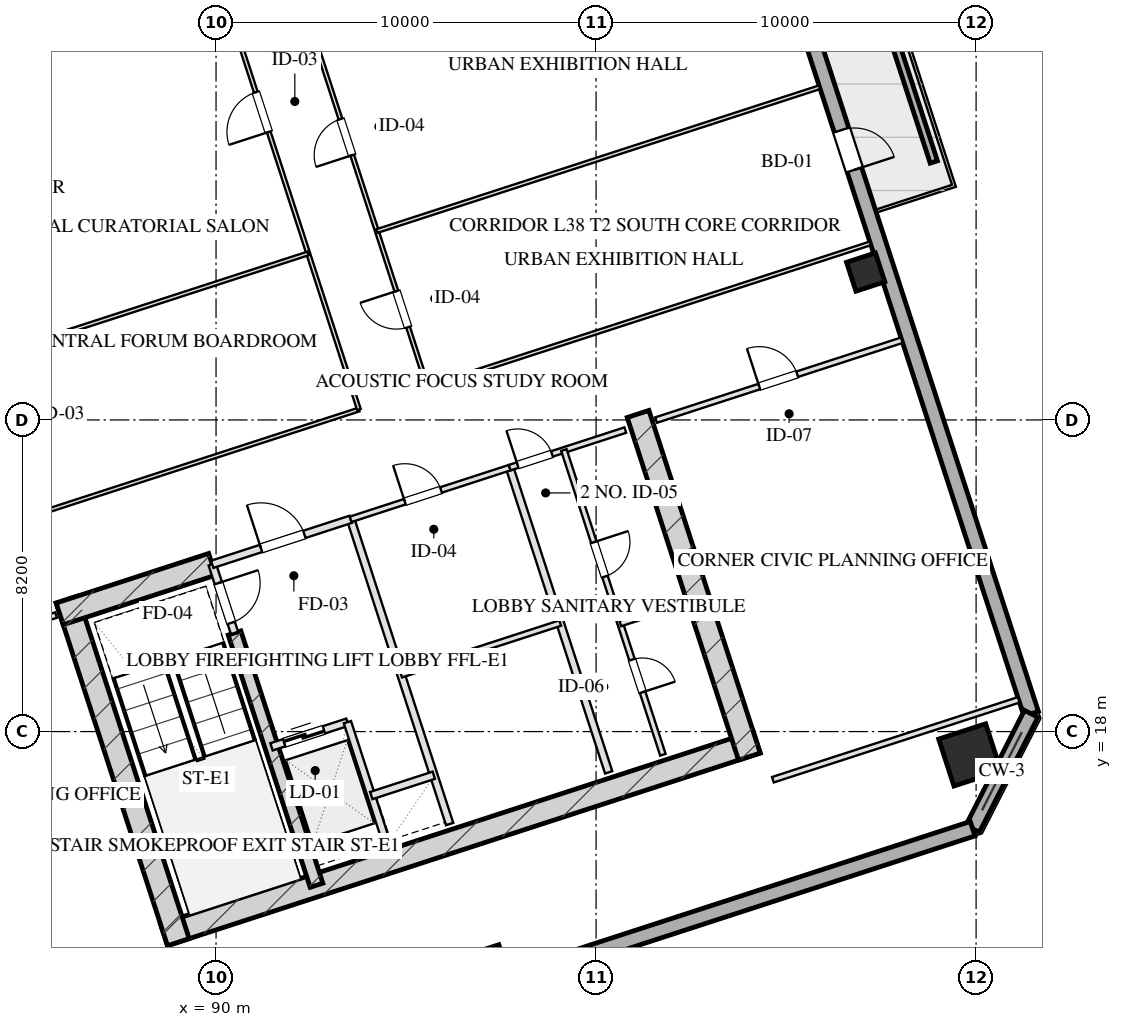
"""IFC4 building model, lengths in metres.
Left out: names, types, materials, properties, quantities, classifications, styles, units other than length and angle.
Written with IfcOpenShell. Run it as: python <this file> out.ifc"""

import sys

from ifc_helpers import new_model, si_unit, direction, frame, frame_2d, origin, origin_2d, place, context, subcontext, project, spatial, rectangle, hollow_rectangle, extrude, element, fill, save


model = new_model("IFC4")
c1 = context("Model", 3, precision=1e-05, world=origin(), true_north=direction((0.0, 1.0)))
c2 = subcontext(c1, "Body", "Model", "MODEL_VIEW")
j1 = project(units=[si_unit("LENGTHUNIT", "METRE"), si_unit("PLANEANGLEUNIT", "RADIAN")], contexts=[c1])
p1 = place(None, origin())
s1 = spatial("IfcSite", under=j1, at=p1, CompositionType="ELEMENT")
p2 = place(p1, origin())
s2 = spatial("IfcBuilding", under=s1, at=p2, CompositionType="ELEMENT")
p3 = place(p2, frame((0.0, 0.0, 146.05)))
s3 = spatial("IfcBuildingStorey", under=s2, at=p3, CompositionType="ELEMENT", Elevation=146.05)
p4 = place(p3, frame((88.63, 12.652, 0.0), z_axis=(0.0, 0.0, 1.0), x_axis=(0.95105714907, 0.309015046886, 0.0)))
e1 = element("IfcWall", 1, at=p4, inside=s3, PredefinedType="SHEAR", context=c2, shape_type="SweptSolid", body=[
    extrude(rectangle(XDim=16.4, YDim=0.6, at=frame_2d((8.2, 0.0))), origin(), (0.0, 0.0, 1.0), 3.45),
])
p5 = place(p3, frame((86.078, 21.475, 0.0), z_axis=(0.0, 0.0, 1.0), x_axis=(0.309017938678, -0.951056209472, 0.0)))
e2 = element("IfcWall", 2, at=p5, inside=s3, PredefinedType="SHEAR", context=c2, shape_type="SweptSolid", body=[
    extrude(rectangle(XDim=9.48, YDim=0.6, at=frame_2d((4.74, 0.0))), origin(), (0.0, 0.0, 1.0), 3.45),
])
p6 = place(p3, frame((101.105, 26.358, 0.0), z_axis=(0.0, 0.0, 1.0), x_axis=(0.309010370028, -0.95105866865, 0.0)))
e3 = element("IfcWall", 3, at=p6, inside=s3, PredefinedType="SHEAR", context=c2, shape_type="SweptSolid", body=[
    extrude(rectangle(XDim=9.48, YDim=0.6, at=frame_2d((4.74, 0.0))), origin(), (0.0, 0.0, 1.0), 3.45),
])
p7 = place(p3, frame((90.486, 20.594, 0.0), z_axis=(0.0, 0.0, 1.0), x_axis=(0.309020428229, -0.951055400562, 0.0)))
e4 = element("IfcWall", 4, at=p7, inside=s3, PredefinedType="SHEAR", context=c2, shape_type="SweptSolid", body=[
    extrude(rectangle(XDim=6.98, YDim=0.35, at=frame_2d((3.49, 0.0))), origin(), (0.0, 0.0, 1.0), 3.45),
])
p8 = place(p3, frame((85.886, 21.097, 0.0), z_axis=(0.0, 0.0, 1.0), x_axis=(0.951068073652, 0.308981422225, 0.0)))
e5 = element("IfcWall", 5, at=p8, inside=s3, PredefinedType="SHEAR", context=c2, shape_type="SweptSolid", body=[
    extrude(rectangle(XDim=4.22, YDim=0.6, at=frame_2d((2.11, 0.0))), origin(), (0.0, 0.0, 1.0), 3.45),
])
p9 = place(p3, frame((109.835, 17.386, 0.0), z_axis=(0.0, 0.0, 1.0), x_axis=(0.951056516295, 0.309016994375, 0.0)))
e6 = element("IfcColumn", 6, at=p9, inside=s3, PredefinedType="COLUMN", context=c2, shape_type="SweptSolid", body=[
    extrude(hollow_rectangle(XDim=1.3, YDim=1.3, WallThickness=0.045, at=origin_2d()), origin(), (0.0, 0.0, 1.0), 3.451),
])
for number, where, z_axis, x_axis in (
    (7, (107.094, 30.091, 0.0), (0.0, 0.0, 1.0), (0.951, 0.309, 0.0)),
    (8, (97.185, 11.888, 0.0), (0.0, 0.0, 1.0), (0.951, 0.309, 0.0)),
):
    element("IfcColumn", number, at=place(p3, frame(where, z_axis=z_axis, x_axis=x_axis)), inside=s3, PredefinedType="COLUMN", context=c2, shape_type="SweptSolid", body=[
        extrude(hollow_rectangle(XDim=0.8, YDim=0.8, WallThickness=0.028, at=origin_2d()), origin(), (0.0, 0.0, 1.0), 3.451),
    ])
p10 = place(p3, frame((98.224, 59.173, 0.0), z_axis=(0.0, 0.0, 1.0), x_axis=(0.309014228706, -0.951057414911, 0.0)))
e9 = element("IfcWall", 9, at=p10, inside=s3, PredefinedType="SOLIDWALL", context=c2, shape_type="SweptSolid", body=[
    extrude(rectangle(XDim=42.8, YDim=0.4, at=frame_2d((21.4, 0.0))), origin(), (0.0, 0.0, 1.0), 2.61),
])
p11 = place(p10, frame((13.875, 0.0, 0.75)))
e10 = element("IfcOpeningElement", 10, at=p11, cuts=e9, PredefinedType="OPENING", context=c2, shape_type="SweptSolid", body=[
    extrude(rectangle(XDim=2.25, YDim=1.46, at=frame_2d((1.125, 0.73))), frame((0.0, 0.21, 0.0), z_axis=(0.0, -1.0, 0.0), x_axis=(1.0, 0.0, 0.0)), (0.0, 0.0, 1.0), 0.42),
])
p12 = place(p10, frame((26.65, 0.0, 0.0)))
e11 = element("IfcOpeningElement", 11, at=p12, cuts=e9, PredefinedType="OPENING", context=c2, shape_type="SweptSolid", body=[
    extrude(rectangle(XDim=1.1, YDim=2.15, at=frame_2d((0.55, 1.075))), frame((0.0, 0.21, 0.0), z_axis=(0.0, -1.0, 0.0), x_axis=(1.0, 0.0, 0.0)), (0.0, 0.0, 1.0), 0.42),
])
p13 = place(p3, frame((111.449, 18.468, 0.0), z_axis=(0.0, 0.0, 1.0), x_axis=(-0.454019523198, -0.890991735402, 0.0)))
e12 = element("IfcWall", 12, at=p13, inside=s3, PredefinedType="SOLIDWALL", context=c2, shape_type="SweptSolid", body=[
    extrude(rectangle(XDim=3.394, YDim=0.4, at=frame_2d((1.697, 0.0))), origin(), (0.0, 0.0, 1.0), 2.61),
])
p14 = place(p3, frame((109.908, 15.444, 0.0), z_axis=(0.0, 0.0, 1.0), x_axis=(-0.951057580055, -0.30901372044, 0.0)))
e13 = element("IfcWall", 13, at=p14, inside=s3, PredefinedType="SOLIDWALL", context=c2, shape_type="SweptSolid", body=[
    extrude(rectangle(XDim=26.4, YDim=0.4, at=frame_2d((13.2, 0.0))), origin(), (0.0, 0.0, 1.0), 2.61),
])
p15 = place(p3, frame((108.887, 32.987, 0.0), z_axis=(0.0, 0.0, 1.0), x_axis=(-0.30900096172, 0.951061725471, 0.0)))
e14 = element("IfcWall", 14, at=p15, inside=s3, PredefinedType="PARAPET", context=c2, shape_type="SweptSolid", body=[
    extrude(rectangle(XDim=4.8, YDim=0.2, at=frame_2d((2.4, 0.0))), origin(), (0.0, 0.0, 1.0), 0.75),
])
p16 = place(p3, frame((89.899, 22.401, 0.0), z_axis=(0.0, 0.0, 1.0), x_axis=(0.308932062672, -0.951084108086, 0.0)))
e15 = element("IfcWall", 15, at=p16, inside=s3, PredefinedType="PARTITIONING", context=c2, shape_type="SweptSolid", body=[
    extrude(rectangle(XDim=1.9, YDim=0.2, at=frame_2d((0.95, 0.0))), origin(), (0.0, 0.0, 1.0), 3.175),
])
p17 = place(p16, frame((0.52, 0.0, 0.0)))
e16 = element("IfcOpeningElement", 16, at=p17, cuts=e15, PredefinedType="OPENING", context=c2, shape_type="SweptSolid", body=[
    extrude(rectangle(XDim=1.1, YDim=2.05, at=frame_2d((0.55, 1.025))), frame((0.0, 0.11, 0.0), z_axis=(0.0, -1.0, 0.0), x_axis=(1.0, 0.0, 0.0)), (0.0, 0.0, 1.0), 0.22),
])
p18 = place(p3, frame((93.542, 23.585, 0.0), z_axis=(0.0, 0.0, 1.0), x_axis=(0.309042196757, -0.951048327176, 0.0)))
e17 = element("IfcWall", 17, at=p18, inside=s3, PredefinedType="PARTITIONING", context=c2, shape_type="SweptSolid", body=[
    extrude(rectangle(XDim=8.43, YDim=0.2, at=frame_2d((4.215, 0.0))), origin(), (0.0, 0.0, 1.0), 3.175),
])
p19 = place(p3, frame((89.899, 22.401, 0.0), z_axis=(0.0, 0.0, 1.0), x_axis=(0.951046716504, 0.309047153403, 0.0)))
e18 = element("IfcWall", 18, at=p19, inside=s3, PredefinedType="PARTITIONING", context=c2, shape_type="SweptSolid", body=[
    extrude(rectangle(XDim=3.83, YDim=0.2, at=frame_2d((1.915, 0.0))), origin(), (0.0, 0.0, 1.0), 3.175),
])
p20 = place(p19, frame((1.35, 0.0, 0.0)))
e19 = element("IfcOpeningElement", 19, at=p20, cuts=e18, PredefinedType="OPENING", context=c2, shape_type="SweptSolid", body=[
    extrude(rectangle(XDim=1.2, YDim=2.05, at=frame_2d((0.6, 1.025))), frame((0.0, 0.11, 0.0), z_axis=(0.0, -1.0, 0.0), x_axis=(1.0, 0.0, 0.0)), (0.0, 0.0, 1.0), 0.22),
])
p21 = place(p3, frame((91.46, 17.598, 0.0), z_axis=(0.0, 0.0, 1.0), x_axis=(0.951062257173, 0.308999325213, 0.0)))
e20 = element("IfcWall", 20, at=p21, inside=s3, PredefinedType="PARTITIONING", context=c2, shape_type="SweptSolid", body=[
    extrude(rectangle(XDim=2.1, YDim=0.2, at=frame_2d((1.05, 0.0))), origin(), (0.0, 0.0, 1.0), 3.175),
])
p22 = place(p21, frame((0.35, 0.0, 0.0)))
e21 = element("IfcOpeningElement", 21, at=p22, cuts=e20, PredefinedType="OPENING", context=c2, shape_type="SweptSolid", body=[
    extrude(rectangle(XDim=1.1, YDim=2.05, at=frame_2d((0.55, 1.025))), frame((0.0, 0.11, 0.0), z_axis=(0.0, -1.0, 0.0), x_axis=(1.0, 0.0, 0.0)), (0.0, 0.0, 1.0), 0.22),
])
p23 = place(p3, frame((93.457, 18.247, 0.0), z_axis=(0.0, 0.0, 1.0), x_axis=(0.3089935693, -0.951064127245, 0.0)))
e22 = element("IfcWall", 22, at=p23, inside=s3, PredefinedType="PARTITIONING", context=c2, shape_type="SweptSolid", body=[
    extrude(rectangle(XDim=3.7, YDim=0.2, at=frame_2d((1.85, 0.0))), origin(), (0.0, 0.0, 1.0), 3.175),
])
p24 = place(p3, frame((94.084, 16.317, 0.0), z_axis=(0.0, 0.0, 1.0), x_axis=(0.951041328149, 0.309063734775, 0.0)))
e23 = element("IfcWall", 23, at=p24, inside=s3, PredefinedType="PARTITIONING", context=c2, shape_type="SweptSolid", body=[
    extrude(rectangle(XDim=1.73, YDim=0.2, at=frame_2d((0.865, 0.0))), origin(), (0.0, 0.0, 1.0), 3.175),
])
p25 = place(p3, frame((97.727, 24.944, 0.0), z_axis=(0.0, 0.0, 1.0), x_axis=(0.309016001439, -0.951056838919, 0.0)))
e24 = element("IfcWall", 24, at=p25, inside=s3, PredefinedType="PARTITIONING", context=c2, shape_type="SweptSolid", body=[
    extrude(rectangle(XDim=8.43, YDim=0.2, at=frame_2d((4.215, 0.0))), origin(), (0.0, 0.0, 1.0), 3.175),
])
p26 = place(p3, frame((93.542, 23.585, 0.0), z_axis=(0.0, 0.0, 1.0), x_axis=(0.951063829732, 0.308994485023, 0.0)))
e25 = element("IfcWall", 25, at=p26, inside=s3, PredefinedType="PARTITIONING", context=c2, shape_type="SweptSolid", body=[
    extrude(rectangle(XDim=4.4, YDim=0.15, at=frame_2d((2.2, 0.0))), origin(), (0.0, 0.0, 1.0), 3.175),
])
p27 = place(p26, frame((1.5, 0.0, 0.0)))
e26 = element("IfcOpeningElement", 26, at=p27, cuts=e25, PredefinedType="OPENING", context=c2, shape_type="SweptSolid", body=[
    extrude(rectangle(XDim=1.0, YDim=2.05, at=frame_2d((0.5, 1.025))), frame((0.0, 0.085, 0.0), z_axis=(0.0, -1.0, 0.0), x_axis=(1.0, 0.0, 0.0)), (0.0, 0.0, 1.0), 0.17),
])
p28 = place(p3, frame((94.871, 19.495, 0.0), z_axis=(0.0, 0.0, 1.0), x_axis=(0.951042223598, 0.309060979314, 0.0)))
e27 = element("IfcWall", 27, at=p28, inside=s3, PredefinedType="PARTITIONING", context=c2, shape_type="SweptSolid", body=[
    extrude(rectangle(XDim=4.4, YDim=0.15, at=frame_2d((2.2, 0.0))), origin(), (0.0, 0.0, 1.0), 3.175),
])
p29 = place(p3, frame((97.727, 24.944, 0.0), z_axis=(0.0, 0.0, 1.0), x_axis=(0.951036872128, 0.309077446369, 0.0)))
e28 = element("IfcWall", 28, at=p29, inside=s3, PredefinedType="PARTITIONING", context=c2, shape_type="SweptSolid", body=[
    extrude(rectangle(XDim=3.2, YDim=0.15, at=frame_2d((1.6, 0.0))), origin(), (0.0, 0.0, 1.0), 3.175),
])
p30 = place(p29, frame((0.22, 0.0, 0.0)))
e29 = element("IfcOpeningElement", 29, at=p30, cuts=e28, PredefinedType="OPENING", context=c2, shape_type="SweptSolid", body=[
    extrude(rectangle(XDim=0.95, YDim=2.05, at=frame_2d((0.475, 1.025))), frame((0.0, 0.085, 0.0), z_axis=(0.0, -1.0, 0.0), x_axis=(1.0, 0.0, 0.0)), (0.0, 0.0, 1.0), 0.17),
])
p31 = place(p3, frame((99.153, 25.408, 0.0), z_axis=(0.0, 0.0, 1.0), x_axis=(0.309016001439, -0.951056838919, 0.0)))
e30 = element("IfcWall", 30, at=p31, inside=s3, PredefinedType="PARTITIONING", context=c2, shape_type="SweptSolid", body=[
    extrude(rectangle(XDim=8.43, YDim=0.15, at=frame_2d((4.215, 0.0))), origin(), (0.0, 0.0, 1.0), 3.175),
])
p32 = place(p31, frame((2.55, 0.0, 0.0)))
e31 = element("IfcOpeningElement", 31, at=p32, cuts=e30, PredefinedType="OPENING", context=c2, shape_type="SweptSolid", body=[
    extrude(rectangle(XDim=0.95, YDim=2.05, at=frame_2d((0.475, 1.025))), frame((0.0, 0.085, 0.0), z_axis=(0.0, -1.0, 0.0), x_axis=(1.0, 0.0, 0.0)), (0.0, 0.0, 1.0), 0.17),
])
p33 = place(p31, frame((5.8, 0.0, 0.0)))
e32 = element("IfcOpeningElement", 32, at=p33, cuts=e30, PredefinedType="OPENING", context=c2, shape_type="SweptSolid", body=[
    extrude(rectangle(XDim=0.9, YDim=2.05, at=frame_2d((0.45, 1.025))), frame((0.0, 0.085, 0.0), z_axis=(0.0, -1.0, 0.0), x_axis=(1.0, 0.0, 0.0)), (0.0, 0.0, 1.0), 0.17),
])
p34 = place(p3, frame((100.636, 20.843, 0.0), z_axis=(0.0, 0.0, 1.0), x_axis=(0.951040401051, 0.309066587596, 0.0)))
e33 = element("IfcWall", 33, at=p34, inside=s3, PredefinedType="PARTITIONING", context=c2, shape_type="SweptSolid", body=[
    extrude(rectangle(XDim=1.7, YDim=0.15, at=frame_2d((0.85, 0.0))), origin(), (0.0, 0.0, 1.0), 3.175),
])
p35 = place(p3, frame((78.753, 18.78, 0.0), z_axis=(0.0, 0.0, 1.0), x_axis=(0.951060977215, 0.309003264738, 0.0)))
e34 = element("IfcWall", 34, at=p35, inside=s3, PredefinedType="PARTITIONING", context=c2, shape_type="SweptSolid", body=[
    extrude(rectangle(XDim=7.4, YDim=0.15, at=frame_2d((3.7, 0.0))), origin(), (0.0, 0.0, 1.0), 3.175),
])
p36 = place(p35, frame((3.108, 0.0, 0.0)))
e35 = element("IfcOpeningElement", 35, at=p36, cuts=e34, PredefinedType="OPENING", context=c2, shape_type="SweptSolid", body=[
    extrude(rectangle(XDim=1.0, YDim=2.05, at=frame_2d((0.5, 1.025))), frame((0.0, 0.085, 0.0), z_axis=(0.0, -1.0, 0.0), x_axis=(1.0, 0.0, 0.0)), (0.0, 0.0, 1.0), 0.17),
])
p37 = place(p3, frame((104.653, 16.733, 0.0), z_axis=(0.0, 0.0, 1.0), x_axis=(0.951054383043, 0.309023559774, 0.0)))
e36 = element("IfcWall", 36, at=p37, inside=s3, PredefinedType="PARTITIONING", context=c2, shape_type="SweptSolid", body=[
    extrude(rectangle(XDim=6.8, YDim=0.15, at=frame_2d((3.4, 0.0))), origin(), (0.0, 0.0, 1.0), 3.175),
])
p38 = place(p3, frame((101.578, 26.196, 0.0), z_axis=(0.0, 0.0, 1.0), x_axis=(0.951064934653, 0.308991084134, 0.0)))
e37 = element("IfcWall", 37, at=p38, inside=s3, PredefinedType="PARTITIONING", context=c2, shape_type="SweptSolid", body=[
    extrude(rectangle(XDim=6.8, YDim=0.15, at=frame_2d((3.4, 0.0))), origin(), (0.0, 0.0, 1.0), 3.175),
])
p39 = place(p38, frame((2.856, 0.0, 0.0)))
e38 = element("IfcOpeningElement", 38, at=p39, cuts=e37, PredefinedType="OPENING", context=c2, shape_type="SweptSolid", body=[
    extrude(rectangle(XDim=1.05, YDim=2.05, at=frame_2d((0.525, 1.025))), frame((0.0, 0.085, 0.0), z_axis=(0.0, -1.0, 0.0), x_axis=(1.0, 0.0, 0.0)), (0.0, 0.0, 1.0), 0.17),
])
p40 = place(p3, frame((85.248, 23.708, 0.0), z_axis=(0.0, 0.0, 1.0), x_axis=(0.951059123431, 0.309008970321, 0.0)))
e39 = element("IfcWall", 39, at=p40, inside=s3, PredefinedType="MOVABLE", context=c2, shape_type="SweptSolid", body=[
    extrude(rectangle(XDim=8.95, YDim=0.1, at=frame_2d((4.475, 0.0))), origin(), (0.0, 0.0, 1.0), 3.175),
])
p41 = place(p3, frame((95.567, 27.061, 0.0), z_axis=(0.0, 0.0, 1.0), x_axis=(0.9510516424, 0.30903199428, 0.0)))
e40 = element("IfcWall", 40, at=p41, inside=s3, PredefinedType="MOVABLE", context=c2, shape_type="SweptSolid", body=[
    extrude(rectangle(XDim=12.25, YDim=0.1, at=frame_2d((6.125, 0.0))), origin(), (0.0, 0.0, 1.0), 3.175),
])
p42 = place(p3, frame((93.76, 26.473, 0.0), z_axis=(0.0, 0.0, 1.0), x_axis=(-0.309004459387, 0.951060589068, 0.0)))
e41 = element("IfcWall", 41, at=p42, inside=s3, PredefinedType="MOVABLE", context=c2, shape_type="SweptSolid", body=[
    extrude(rectangle(XDim=16.64, YDim=0.1, at=frame_2d((8.32, 0.0))), origin(), (0.0, 0.0, 1.0), 3.175),
])
p43 = place(p42, frame((7.68, 0.0, 0.0)))
e42 = element("IfcOpeningElement", 42, at=p43, cuts=e41, PredefinedType="OPENING", context=c2, shape_type="SweptSolid", body=[
    extrude(rectangle(XDim=1.1, YDim=2.05, at=frame_2d((0.55, 1.025))), frame((0.0, 0.06, 0.0), z_axis=(0.0, -1.0, 0.0), x_axis=(1.0, 0.0, 0.0)), (0.0, 0.0, 1.0), 0.12),
])
p44 = place(p3, frame((95.567, 27.061, 0.0), z_axis=(0.0, 0.0, 1.0), x_axis=(-0.30901773025, 0.951056277195, 0.0)))
e43 = element("IfcWall", 43, at=p44, inside=s3, PredefinedType="MOVABLE", context=c2, shape_type="SweptSolid", body=[
    extrude(rectangle(XDim=16.64, YDim=0.1, at=frame_2d((8.32, 0.0))), origin(), (0.0, 0.0, 1.0), 3.175),
])
p45 = place(p44, frame((1.66, 0.0, 0.0)))
e44 = element("IfcOpeningElement", 44, at=p45, cuts=e43, PredefinedType="OPENING", context=c2, shape_type="SweptSolid", body=[
    extrude(rectangle(XDim=1.0, YDim=2.05, at=frame_2d((0.5, 1.025))), frame((0.0, 0.06, 0.0), z_axis=(0.0, -1.0, 0.0), x_axis=(1.0, 0.0, 0.0)), (0.0, 0.0, 1.0), 0.12),
])
p46 = place(p44, frame((6.42, 0.0, 0.0)))
e45 = element("IfcOpeningElement", 45, at=p46, cuts=e43, PredefinedType="OPENING", context=c2, shape_type="SweptSolid", body=[
    extrude(rectangle(XDim=1.0, YDim=2.05, at=frame_2d((0.5, 1.025))), frame((0.0, 0.06, 0.0), z_axis=(0.0, -1.0, 0.0), x_axis=(1.0, 0.0, 0.0)), (0.0, 0.0, 1.0), 0.12),
])
p47 = place(p44, frame((12.58, 0.0, 0.0)))
e46 = element("IfcOpeningElement", 46, at=p47, cuts=e43, PredefinedType="OPENING", context=c2, shape_type="SweptSolid", body=[
    extrude(rectangle(XDim=1.0, YDim=2.05, at=frame_2d((0.5, 1.025))), frame((0.0, 0.06, 0.0), z_axis=(0.0, -1.0, 0.0), x_axis=(1.0, 0.0, 0.0)), (0.0, 0.0, 1.0), 0.12),
])
p48 = place(p3, frame((83.913, 27.816, 0.0), z_axis=(0.0, 0.0, 1.0), x_axis=(0.951059123431, 0.309008970321, 0.0)))
e47 = element("IfcWall", 47, at=p48, inside=s3, PredefinedType="MOVABLE", context=c2, shape_type="SweptSolid", body=[
    extrude(rectangle(XDim=8.95, YDim=0.1, at=frame_2d((4.475, 0.0))), origin(), (0.0, 0.0, 1.0), 3.175),
])
p49 = place(p3, frame((81.441, 35.425, 0.0), z_axis=(0.0, 0.0, 1.0), x_axis=(0.951056518616, 0.309016987233, 0.0)))
e48 = element("IfcWall", 48, at=p49, inside=s3, PredefinedType="MOVABLE", context=c2, shape_type="SweptSolid", body=[
    extrude(rectangle(XDim=8.95, YDim=0.1, at=frame_2d((4.475, 0.0))), origin(), (0.0, 0.0, 1.0), 3.175),
])
p50 = place(p3, frame((94.232, 31.169, 0.0), z_axis=(0.0, 0.0, 1.0), x_axis=(0.95105749975, 0.309013967595, 0.0)))
e49 = element("IfcWall", 49, at=p50, inside=s3, PredefinedType="MOVABLE", context=c2, shape_type="SweptSolid", body=[
    extrude(rectangle(XDim=12.25, YDim=0.1, at=frame_2d((6.125, 0.0))), origin(), (0.0, 0.0, 1.0), 3.175),
])
p51 = place(p12, origin())
e50 = element("IfcDoor", 50, at=p51, inside=s3, OperationType="SINGLE_SWING_RIGHT", PredefinedType="DOOR", context=c2, shape_type="SweptSolid", body=[
    extrude(rectangle(XDim=1.1, YDim=2.15, at=frame_2d((0.55, 1.075))), frame((0.0, 0.025, 0.0), z_axis=(0.0, -1.0, 0.0), x_axis=(1.0, 0.0, 0.0)), (0.0, 0.0, 1.0), 0.05),
])
fill(e11, e50)
p52 = place(p17, origin())
e51 = element("IfcDoor", 51, at=p52, inside=s3, OperationType="SINGLE_SWING_LEFT", PredefinedType="DOOR", context=c2, shape_type="SweptSolid", body=[
    extrude(rectangle(XDim=1.1, YDim=2.05, at=frame_2d((0.55, 1.025))), frame((0.0, 0.025, 0.0), z_axis=(0.0, -1.0, 0.0), x_axis=(1.0, 0.0, 0.0)), (0.0, 0.0, 1.0), 0.05),
])
fill(e16, e51)
p53 = place(p20, origin())
e52 = element("IfcDoor", 52, at=p53, inside=s3, OperationType="SINGLE_SWING_LEFT", PredefinedType="DOOR", context=c2, shape_type="SweptSolid", body=[
    extrude(rectangle(XDim=1.2, YDim=2.05, at=frame_2d((0.6, 1.025))), frame((0.0, 0.025, 0.0), z_axis=(0.0, -1.0, 0.0), x_axis=(1.0, 0.0, 0.0)), (0.0, 0.0, 1.0), 0.05),
])
fill(e19, e52)
p54 = place(p22, origin())
e53 = element("IfcDoor", 53, at=p54, inside=s3, OperationType="DOUBLE_DOOR_SLIDING", PredefinedType="DOOR", context=c2, shape_type="SweptSolid", body=[
    extrude(rectangle(XDim=1.1, YDim=2.05, at=frame_2d((0.55, 1.025))), frame((0.0, 0.025, 0.0), z_axis=(0.0, -1.0, 0.0), x_axis=(1.0, 0.0, 0.0)), (0.0, 0.0, 1.0), 0.05),
])
fill(e21, e53)
p55 = place(p27, origin())
e54 = element("IfcDoor", 54, at=p55, inside=s3, OperationType="SINGLE_SWING_LEFT", PredefinedType="DOOR", context=c2, shape_type="SweptSolid", body=[
    extrude(rectangle(XDim=1.0, YDim=2.05, at=frame_2d((0.5, 1.025))), frame((0.0, 0.025, 0.0), z_axis=(0.0, -1.0, 0.0), x_axis=(1.0, 0.0, 0.0)), (0.0, 0.0, 1.0), 0.05),
])
fill(e26, e54)
p56 = place(p30, origin())
e55 = element("IfcDoor", 55, at=p56, inside=s3, OperationType="SINGLE_SWING_LEFT", PredefinedType="DOOR", context=c2, shape_type="SweptSolid", body=[
    extrude(rectangle(XDim=0.95, YDim=2.05, at=frame_2d((0.475, 1.025))), frame((0.0, 0.025, 0.0), z_axis=(0.0, -1.0, 0.0), x_axis=(1.0, 0.0, 0.0)), (0.0, 0.0, 1.0), 0.05),
])
fill(e29, e55)
p57 = place(p32, origin())
e56 = element("IfcDoor", 56, at=p57, inside=s3, OperationType="SINGLE_SWING_LEFT", PredefinedType="DOOR", context=c2, shape_type="SweptSolid", body=[
    extrude(rectangle(XDim=0.95, YDim=2.05, at=frame_2d((0.475, 1.025))), frame((0.0, 0.025, 0.0), z_axis=(0.0, -1.0, 0.0), x_axis=(1.0, 0.0, 0.0)), (0.0, 0.0, 1.0), 0.05),
])
fill(e31, e56)
p58 = place(p33, origin())
e57 = element("IfcDoor", 57, at=p58, inside=s3, OperationType="SINGLE_SWING_RIGHT", PredefinedType="DOOR", context=c2, shape_type="SweptSolid", body=[
    extrude(rectangle(XDim=0.9, YDim=2.05, at=frame_2d((0.45, 1.025))), frame((0.0, 0.025, 0.0), z_axis=(0.0, -1.0, 0.0), x_axis=(1.0, 0.0, 0.0)), (0.0, 0.0, 1.0), 0.05),
])
fill(e32, e57)
p59 = place(p39, origin())
e58 = element("IfcDoor", 58, at=p59, inside=s3, OperationType="SINGLE_SWING_LEFT", PredefinedType="DOOR", context=c2, shape_type="SweptSolid", body=[
    extrude(rectangle(XDim=1.05, YDim=2.05, at=frame_2d((0.525, 1.025))), frame((0.0, 0.025, 0.0), z_axis=(0.0, -1.0, 0.0), x_axis=(1.0, 0.0, 0.0)), (0.0, 0.0, 1.0), 0.05),
])
fill(e38, e58)
p60 = place(p43, origin())
e59 = element("IfcDoor", 59, at=p60, inside=s3, OperationType="SINGLE_SWING_LEFT", PredefinedType="DOOR", context=c2, shape_type="SweptSolid", body=[
    extrude(rectangle(XDim=1.1, YDim=2.05, at=frame_2d((0.55, 1.025))), frame((0.0, 0.025, 0.0), z_axis=(0.0, -1.0, 0.0), x_axis=(1.0, 0.0, 0.0)), (0.0, 0.0, 1.0), 0.05),
])
fill(e42, e59)
p61 = place(p45, origin())
e60 = element("IfcDoor", 60, at=p61, inside=s3, OperationType="SINGLE_SWING_RIGHT", PredefinedType="DOOR", context=c2, shape_type="SweptSolid", body=[
    extrude(rectangle(XDim=1.0, YDim=2.05, at=frame_2d((0.5, 1.025))), frame((0.0, 0.025, 0.0), z_axis=(0.0, -1.0, 0.0), x_axis=(1.0, 0.0, 0.0)), (0.0, 0.0, 1.0), 0.05),
])
fill(e44, e60)
p62 = place(p46, origin())
e61 = element("IfcDoor", 61, at=p62, inside=s3, OperationType="SINGLE_SWING_LEFT", PredefinedType="DOOR", context=c2, shape_type="SweptSolid", body=[
    extrude(rectangle(XDim=1.0, YDim=2.05, at=frame_2d((0.5, 1.025))), frame((0.0, 0.025, 0.0), z_axis=(0.0, -1.0, 0.0), x_axis=(1.0, 0.0, 0.0)), (0.0, 0.0, 1.0), 0.05),
])
fill(e45, e61)
save(model, sys.argv[1])
